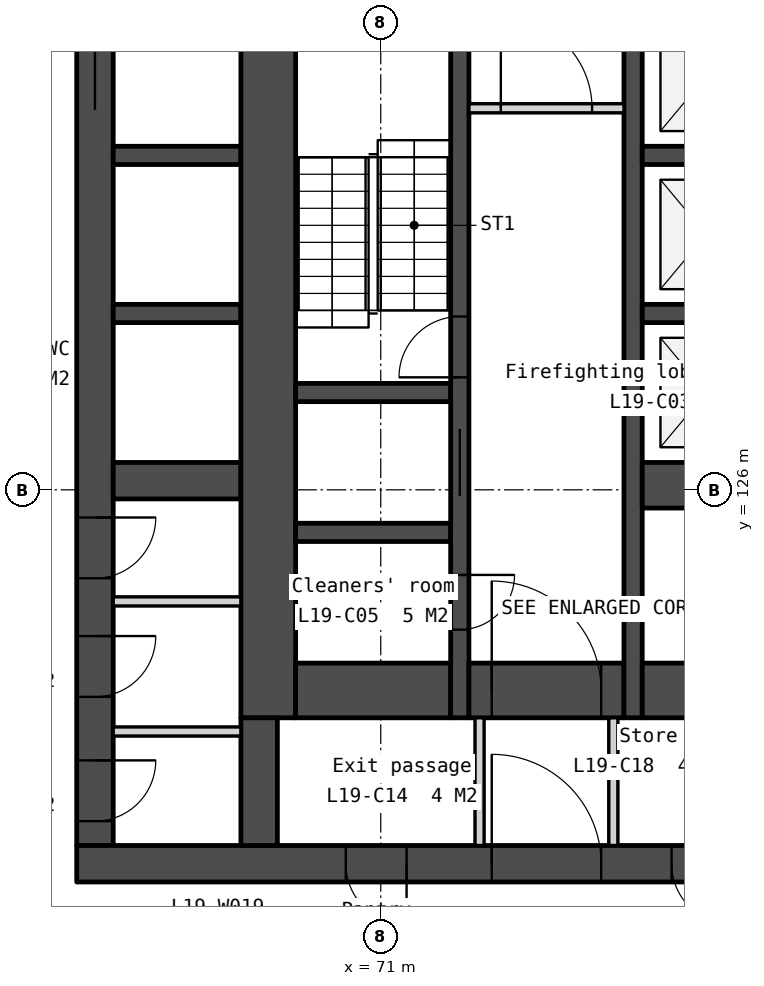
"""IFC4 building model, lengths in metres.
Left out: names, types, materials, properties, quantities, classifications, styles, units other than length and angle.
Written with IfcOpenShell. Run it as: python <this file> out.ifc"""

import sys

from ifc_helpers import new_model, si_unit, direction, frame, frame_2d, origin, place, context, subcontext, project, spatial, polyline, rectangle, outline, extrude, element, fill, save


model = new_model("IFC4")
c1 = context("Model", 3, precision=1e-05, world=origin(), true_north=direction((0.0, 1.0)))
c2 = subcontext(c1, "Body", "Model", "MODEL_VIEW")
j1 = project(units=[si_unit("LENGTHUNIT", "METRE"), si_unit("PLANEANGLEUNIT", "RADIAN")], contexts=[c1])
p1 = place(None, origin())
s1 = spatial("IfcSite", under=j1, at=p1, CompositionType="ELEMENT")
p2 = place(p1, origin())
s2 = spatial("IfcBuilding", under=s1, at=p2, CompositionType="ELEMENT")
p3 = place(p2, frame((0.0, 0.0, 81.8)))
s3 = spatial("IfcBuildingStorey", under=s2, at=p3, CompositionType="ELEMENT", Elevation=81.8)
p4 = place(p3, frame((66.3, 133.95, 0.0), z_axis=(0.0, 0.0, 1.0), x_axis=(0.0, -1.0, 0.0)))
e1 = element("IfcWall", 1, at=p4, inside=s3, PredefinedType="SOLIDWALL", context=c2, shape_type="SweptSolid", body=[
    extrude(rectangle(XDim=13.8, YDim=0.6, at=frame_2d((6.9, 0.0))), origin(), (0.0, 0.0, 1.0), 3.35),
])
p5 = place(p4, frame((0.6, 0.0, 0.0)))
e2 = element("IfcOpeningElement", 2, at=p5, cuts=e1, PredefinedType="OPENING", context=c2, shape_type="SweptSolid", body=[
    extrude(rectangle(XDim=1.1, YDim=2.1, at=frame_2d((0.55, 1.05))), frame((0.0, 0.31, 0.0), z_axis=(0.0, -1.0, 0.0), x_axis=(1.0, 0.0, 0.0)), (0.0, 0.0, 1.0), 0.62),
])
p6 = place(p4, frame((8.405, 0.0, 0.0)))
e3 = element("IfcOpeningElement", 3, at=p6, cuts=e1, PredefinedType="OPENING", context=c2, shape_type="SweptSolid", body=[
    extrude(rectangle(XDim=1.0, YDim=2.1, at=frame_2d((0.5, 1.05))), frame((0.0, 0.31, 0.0), z_axis=(0.0, -1.0, 0.0), x_axis=(1.0, 0.0, 0.0)), (0.0, 0.0, 1.0), 0.62),
])
p7 = place(p4, frame((10.355, 0.0, 0.0)))
e4 = element("IfcOpeningElement", 4, at=p7, cuts=e1, PredefinedType="OPENING", context=c2, shape_type="SweptSolid", body=[
    extrude(rectangle(XDim=1.0, YDim=2.1, at=frame_2d((0.5, 1.05))), frame((0.0, 0.31, 0.0), z_axis=(0.0, -1.0, 0.0), x_axis=(1.0, 0.0, 0.0)), (0.0, 0.0, 1.0), 0.62),
])
p8 = place(p4, frame((12.4, 0.0, 0.0)))
e5 = element("IfcOpeningElement", 5, at=p8, cuts=e1, PredefinedType="OPENING", context=c2, shape_type="SweptSolid", body=[
    extrude(rectangle(XDim=1.0, YDim=2.1, at=frame_2d((0.5, 1.05))), frame((0.0, 0.31, 0.0), z_axis=(0.0, -1.0, 0.0), x_axis=(1.0, 0.0, 0.0)), (0.0, 0.0, 1.0), 0.62),
])
p9 = place(p3, frame((66.0, 119.85, 0.0), z_axis=(0.0, 0.0, 1.0), x_axis=(1.0, 0.0, 0.0)))
e6 = element("IfcWall", 6, at=p9, inside=s3, PredefinedType="SOLIDWALL", context=c2, shape_type="SweptSolid", body=[
    extrude(rectangle(XDim=28.0, YDim=0.6, at=frame_2d((14.0, 0.0))), origin(), (0.0, 0.0, 1.0), 3.35),
])
p10 = place(p9, frame((6.825, 0.0, 0.0)))
e7 = element("IfcOpeningElement", 7, at=p10, cuts=e6, PredefinedType="OPENING", context=c2, shape_type="SweptSolid", body=[
    extrude(rectangle(XDim=1.8, YDim=2.1, at=frame_2d((0.9, 1.05))), frame((0.0, 0.31, 0.0), z_axis=(0.0, -1.0, 0.0), x_axis=(1.0, 0.0, 0.0)), (0.0, 0.0, 1.0), 0.62),
])
p11 = place(p9, frame((15.85, 0.0, 0.0)))
e8 = element("IfcOpeningElement", 8, at=p11, cuts=e6, PredefinedType="OPENING", context=c2, shape_type="SweptSolid", body=[
    extrude(rectangle(XDim=1.5, YDim=2.1, at=frame_2d((0.75, 1.05))), frame((0.0, 0.31, 0.0), z_axis=(0.0, -1.0, 0.0), x_axis=(1.0, 0.0, 0.0)), (0.0, 0.0, 1.0), 0.62),
])
p12 = place(p9, frame((19.375, 0.0, 0.0)))
e9 = element("IfcOpeningElement", 9, at=p12, cuts=e6, PredefinedType="OPENING", context=c2, shape_type="SweptSolid", body=[
    extrude(rectangle(XDim=1.8, YDim=2.1, at=frame_2d((0.9, 1.05))), frame((0.0, 0.31, 0.0), z_axis=(0.0, -1.0, 0.0), x_axis=(1.0, 0.0, 0.0)), (0.0, 0.0, 1.0), 0.62),
])
p13 = place(p9, frame((4.425, 0.0, 0.0)))
e10 = element("IfcOpeningElement", 10, at=p13, cuts=e6, PredefinedType="OPENING", context=c2, shape_type="SweptSolid", body=[
    extrude(rectangle(XDim=1.0, YDim=2.1, at=frame_2d((0.5, 1.05))), frame((0.0, 0.31, 0.0), z_axis=(0.0, -1.0, 0.0), x_axis=(1.0, 0.0, 0.0)), (0.0, 0.0, 1.0), 0.62),
])
p14 = place(p9, frame((9.783, 0.0, 0.0)))
e11 = element("IfcOpeningElement", 11, at=p14, cuts=e6, PredefinedType="OPENING", context=c2, shape_type="SweptSolid", body=[
    extrude(rectangle(XDim=1.0, YDim=2.1, at=frame_2d((0.5, 1.05))), frame((0.0, 0.31, 0.0), z_axis=(0.0, -1.0, 0.0), x_axis=(1.0, 0.0, 0.0)), (0.0, 0.0, 1.0), 0.62),
])
p15 = place(p9, frame((11.525, 0.0, 0.0)))
e12 = element("IfcOpeningElement", 12, at=p15, cuts=e6, PredefinedType="OPENING", context=c2, shape_type="SweptSolid", body=[
    extrude(rectangle(XDim=1.0, YDim=2.1, at=frame_2d((0.5, 1.05))), frame((0.0, 0.31, 0.0), z_axis=(0.0, -1.0, 0.0), x_axis=(1.0, 0.0, 0.0)), (0.0, 0.0, 1.0), 0.62),
])
p16 = place(p9, frame((13.658, 0.0, 0.0)))
e13 = element("IfcOpeningElement", 13, at=p16, cuts=e6, PredefinedType="OPENING", context=c2, shape_type="SweptSolid", body=[
    extrude(rectangle(XDim=1.0, YDim=2.1, at=frame_2d((0.5, 1.05))), frame((0.0, 0.31, 0.0), z_axis=(0.0, -1.0, 0.0), x_axis=(1.0, 0.0, 0.0)), (0.0, 0.0, 1.0), 0.62),
])
p17 = place(p9, frame((21.725, 0.0, 0.0)))
e14 = element("IfcOpeningElement", 14, at=p17, cuts=e6, PredefinedType="OPENING", context=c2, shape_type="SweptSolid", body=[
    extrude(rectangle(XDim=1.0, YDim=2.1, at=frame_2d((0.5, 1.05))), frame((0.0, 0.31, 0.0), z_axis=(0.0, -1.0, 0.0), x_axis=(1.0, 0.0, 0.0)), (0.0, 0.0, 1.0), 0.62),
])
p18 = place(p9, frame((23.425, 0.0, 0.0)))
e15 = element("IfcOpeningElement", 15, at=p18, cuts=e6, PredefinedType="OPENING", context=c2, shape_type="SweptSolid", body=[
    extrude(rectangle(XDim=1.0, YDim=2.1, at=frame_2d((0.5, 1.05))), frame((0.0, 0.31, 0.0), z_axis=(0.0, -1.0, 0.0), x_axis=(1.0, 0.0, 0.0)), (0.0, 0.0, 1.0), 0.62),
])
for number, where, z_axis, x_axis in (
    (16, (66.6, 131.5, 0.0), (0.0, 0.0, 1.0), (1.0, 0.0, 0.0)),
    (17, (66.6, 128.9, 0.0), (0.0, 0.0, 1.0), (1.0, 0.0, 0.0)),
):
    element("IfcWall", number, at=place(p3, frame(where, z_axis=z_axis, x_axis=x_axis)), inside=s3, PredefinedType="SOLIDWALL", context=c2, shape_type="SweptSolid", body=[
        extrude(rectangle(XDim=2.1, YDim=0.3, at=frame_2d((1.05, 0.0))), origin(), (0.0, 0.0, 1.0), 3.35),
    ])
p19 = place(p3, frame((66.6, 126.15, 0.0), z_axis=(0.0, 0.0, 1.0), x_axis=(1.0, 0.0, 0.0)))
e18 = element("IfcWall", 18, at=p19, inside=s3, PredefinedType="SOLIDWALL", context=c2, shape_type="SweptSolid", body=[
    extrude(rectangle(XDim=2.1, YDim=0.6, at=frame_2d((1.05, 0.0))), origin(), (0.0, 0.0, 1.0), 3.35),
])
for number, where, z_axis, x_axis in (
    (19, (66.6, 124.165, 0.0), (0.0, 0.0, 1.0), (1.0, 0.0, 0.0)),
    (20, (66.6, 122.025, 0.0), (0.0, 0.0, 1.0), (1.0, 0.0, 0.0)),
):
    element("IfcWall", number, at=place(p3, frame(where, z_axis=z_axis, x_axis=x_axis)), inside=s3, PredefinedType="PARTITIONING", context=c2, shape_type="SweptSolid", body=[
        extrude(rectangle(XDim=2.1, YDim=0.15, at=frame_2d((1.05, 0.0))), origin(), (0.0, 0.0, 1.0), 3.35),
    ])
p20 = place(p3, frame((69.15, 133.95, 0.0), z_axis=(0.0, 0.0, 1.0), x_axis=(0.0, -1.0, 0.0)))
e21 = element("IfcWall", 21, at=p20, inside=s3, PredefinedType="SOLIDWALL", context=c2, shape_type="SweptSolid", body=[
    extrude(rectangle(XDim=11.7, YDim=0.9, at=frame_2d((5.85, 0.0))), origin(), (0.0, 0.0, 1.0), 3.35),
])
p21 = place(p3, frame((69.0, 122.25, 0.0), z_axis=(0.0, 0.0, 1.0), x_axis=(0.0, -1.0, 0.0)))
e22 = element("IfcWall", 22, at=p21, inside=s3, PredefinedType="SOLIDWALL", context=c2, shape_type="SweptSolid", body=[
    extrude(rectangle(XDim=2.1, YDim=0.6, at=frame_2d((1.05, 0.0))), origin(), (0.0, 0.0, 1.0), 3.35),
])
for number, where, z_axis, x_axis in (
    (23, (69.6, 127.6, 0.0), (0.0, 0.0, 1.0), (1.0, 0.0, 0.0)),
    (24, (69.6, 125.3, 0.0), (0.0, 0.0, 1.0), (1.0, 0.0, 0.0)),
):
    element("IfcWall", number, at=place(p3, frame(where, z_axis=z_axis, x_axis=x_axis)), inside=s3, PredefinedType="SOLIDWALL", context=c2, shape_type="SweptSolid", body=[
        extrude(rectangle(XDim=2.55, YDim=0.3, at=frame_2d((1.275, 0.0))), origin(), (0.0, 0.0, 1.0), 3.35),
    ])
p22 = place(p3, frame((69.6, 122.7, 0.0), z_axis=(0.0, 0.0, 1.0), x_axis=(1.0, 0.0, 0.0)))
e25 = element("IfcWall", 25, at=p22, inside=s3, PredefinedType="SOLIDWALL", context=c2, shape_type="SweptSolid", body=[
    extrude(rectangle(XDim=2.55, YDim=0.9, at=frame_2d((1.275, 0.0))), origin(), (0.0, 0.0, 1.0), 3.35),
])
p23 = place(p3, frame((72.3, 133.95, 0.0), z_axis=(0.0, 0.0, 1.0), x_axis=(0.0, -1.0, 0.0)))
e26 = element("IfcWall", 26, at=p23, inside=s3, PredefinedType="SOLIDWALL", context=c2, shape_type="SweptSolid", body=[
    extrude(rectangle(XDim=11.7, YDim=0.3, at=frame_2d((5.85, 0.0))), origin(), (0.0, 0.0, 1.0), 3.35),
])
p24 = place(p23, frame((6.95, 0.0, 0.0)))
e27 = element("IfcOpeningElement", 27, at=p24, cuts=e26, PredefinedType="OPENING", context=c2, shape_type="SweptSolid", body=[
    extrude(rectangle(XDim=1.1, YDim=2.1, at=frame_2d((0.55, 1.05))), frame((0.0, 0.16, 0.0), z_axis=(0.0, -1.0, 0.0), x_axis=(1.0, 0.0, 0.0)), (0.0, 0.0, 1.0), 0.32),
])
p25 = place(p23, frame((9.35, 0.0, 0.0)))
e28 = element("IfcOpeningElement", 28, at=p25, cuts=e26, PredefinedType="OPENING", context=c2, shape_type="SweptSolid", body=[
    extrude(rectangle(XDim=0.9, YDim=2.1, at=frame_2d((0.45, 1.05))), frame((0.0, 0.16, 0.0), z_axis=(0.0, -1.0, 0.0), x_axis=(1.0, 0.0, 0.0)), (0.0, 0.0, 1.0), 0.32),
])
p26 = place(p23, frame((5.1, 0.0, 0.0)))
e29 = element("IfcOpeningElement", 29, at=p26, cuts=e26, PredefinedType="OPENING", context=c2, shape_type="SweptSolid", body=[
    extrude(rectangle(XDim=1.0, YDim=2.1, at=frame_2d((0.5, 1.05))), frame((0.0, 0.16, 0.0), z_axis=(0.0, -1.0, 0.0), x_axis=(1.0, 0.0, 0.0)), (0.0, 0.0, 1.0), 0.32),
])
p27 = place(p3, frame((72.45, 132.275, 0.0), z_axis=(0.0, 0.0, 1.0), x_axis=(1.0, 0.0, 0.0)))
e30 = element("IfcWall", 30, at=p27, inside=s3, PredefinedType="PARTITIONING", context=c2, shape_type="SweptSolid", body=[
    extrude(rectangle(XDim=2.55, YDim=0.15, at=frame_2d((1.275, 0.0))), origin(), (0.0, 0.0, 1.0), 3.35),
])
p28 = place(p27, frame((0.525, 0.0, 0.0)))
e31 = element("IfcOpeningElement", 31, at=p28, cuts=e30, PredefinedType="OPENING", context=c2, shape_type="SweptSolid", body=[
    extrude(rectangle(XDim=1.5, YDim=2.1, at=frame_2d((0.75, 1.05))), frame((0.0, 0.085, 0.0), z_axis=(0.0, -1.0, 0.0), x_axis=(1.0, 0.0, 0.0)), (0.0, 0.0, 1.0), 0.17),
])
p29 = place(p3, frame((72.45, 122.7, 0.0), z_axis=(0.0, 0.0, 1.0), x_axis=(1.0, 0.0, 0.0)))
e32 = element("IfcWall", 32, at=p29, inside=s3, PredefinedType="SOLIDWALL", context=c2, shape_type="SweptSolid", body=[
    extrude(rectangle(XDim=2.55, YDim=0.9, at=frame_2d((1.275, 0.0))), origin(), (0.0, 0.0, 1.0), 3.35),
])
p30 = place(p29, frame((0.375, 0.0, 0.0)))
e33 = element("IfcOpeningElement", 33, at=p30, cuts=e32, PredefinedType="OPENING", context=c2, shape_type="SweptSolid", body=[
    extrude(rectangle(XDim=1.8, YDim=2.1, at=frame_2d((0.9, 1.05))), frame((0.0, 0.46, 0.0), z_axis=(0.0, -1.0, 0.0), x_axis=(1.0, 0.0, 0.0)), (0.0, 0.0, 1.0), 0.92),
])
for number, where, z_axis, x_axis in (
    (34, (72.625, 122.25, 0.0), (0.0, 0.0, 1.0), (0.0, -1.0, 0.0)),
    (35, (74.825, 122.25, 0.0), (0.0, 0.0, 1.0), (0.0, -1.0, 0.0)),
):
    element("IfcWall", number, at=place(p3, frame(where, z_axis=z_axis, x_axis=x_axis)), inside=s3, PredefinedType="PARTITIONING", context=c2, shape_type="SweptSolid", body=[
        extrude(rectangle(XDim=2.1, YDim=0.15, at=frame_2d((1.05, 0.0))), origin(), (0.0, 0.0, 1.0), 3.35),
    ])
p31 = place(p3, frame((75.15, 133.95, 0.0), z_axis=(0.0, 0.0, 1.0), x_axis=(0.0, -1.0, 0.0)))
e36 = element("IfcWall", 36, at=p31, inside=s3, PredefinedType="SOLIDWALL", context=c2, shape_type="SweptSolid", body=[
    extrude(rectangle(XDim=11.7, YDim=0.3, at=frame_2d((5.85, 0.0))), origin(), (0.0, 0.0, 1.0), 3.35),
])
for number, where, z_axis, x_axis in (
    (37, (75.3, 131.5, 0.0), (0.0, 0.0, 1.0), (1.0, 0.0, 0.0)),
    (38, (75.3, 128.9, 0.0), (0.0, 0.0, 1.0), (1.0, 0.0, 0.0)),
):
    element("IfcWall", number, at=place(p3, frame(where, z_axis=z_axis, x_axis=x_axis)), inside=s3, PredefinedType="SOLIDWALL", context=c2, shape_type="SweptSolid", body=[
        extrude(rectangle(XDim=2.1, YDim=0.3, at=frame_2d((1.05, 0.0))), origin(), (0.0, 0.0, 1.0), 3.35),
    ])
p32 = place(p3, frame((75.3, 126.075, 0.0), z_axis=(0.0, 0.0, 1.0), x_axis=(1.0, 0.0, 0.0)))
e39 = element("IfcWall", 39, at=p32, inside=s3, PredefinedType="SOLIDWALL", context=c2, shape_type="SweptSolid", body=[
    extrude(rectangle(XDim=2.1, YDim=0.75, at=frame_2d((1.05, 0.0))), origin(), (0.0, 0.0, 1.0), 3.35),
])
p33 = place(p3, frame((75.3, 122.7, 0.0), z_axis=(0.0, 0.0, 1.0), x_axis=(1.0, 0.0, 0.0)))
e40 = element("IfcWall", 40, at=p33, inside=s3, PredefinedType="SOLIDWALL", context=c2, shape_type="SweptSolid", body=[
    extrude(rectangle(XDim=6.2, YDim=0.9, at=frame_2d((3.1, 0.0))), origin(), (0.0, 0.0, 1.0), 3.35),
])
p34 = place(p3, frame((56.073, 130.263, -0.45), z_axis=(0.0, 0.0, 1.0), x_axis=(0.500000478905, -0.866025127289, 0.0)))
e41 = element("IfcWall", 41, at=p34, inside=s3, PredefinedType="SOLIDWALL", context=c2, shape_type="SweptSolid", body=[
    extrude(outline(polyline([(42.643, 0.0), (42.643, 3.8), (0.0, 3.8), (0.0, 0.0), (42.643, 0.0)])), frame((0.0, 0.225, 0.0), z_axis=(0.0, -1.0, 0.0), x_axis=(1.0, 0.0, 0.0)), (0.0, 0.0, 1.0), 0.45),
])
p35 = place(p34, frame((2.814, 0.0, 1.35)))
e42 = element("IfcOpeningElement", 42, at=p35, cuts=e41, PredefinedType="OPENING", context=c2, shape_type="SweptSolid", body=[
    extrude(rectangle(XDim=1.2, YDim=1.5, at=frame_2d((0.6, 0.75))), frame((0.0, 0.235, 0.0), z_axis=(0.0, -1.0, 0.0), x_axis=(1.0, 0.0, 0.0)), (0.0, 0.0, 1.0), 0.47),
])
p36 = place(p34, frame((4.514, 0.0, 1.35)))
e43 = element("IfcOpeningElement", 43, at=p36, cuts=e41, PredefinedType="OPENING", context=c2, shape_type="SweptSolid", body=[
    extrude(rectangle(XDim=1.2, YDim=1.5, at=frame_2d((0.6, 0.75))), frame((0.0, 0.235, 0.0), z_axis=(0.0, -1.0, 0.0), x_axis=(1.0, 0.0, 0.0)), (0.0, 0.0, 1.0), 0.47),
])
p37 = place(p34, frame((11.343, 0.0, 1.35)))
e44 = element("IfcOpeningElement", 44, at=p37, cuts=e41, PredefinedType="OPENING", context=c2, shape_type="SweptSolid", body=[
    extrude(rectangle(XDim=1.2, YDim=1.5, at=frame_2d((0.6, 0.75))), frame((0.0, 0.235, 0.0), z_axis=(0.0, -1.0, 0.0), x_axis=(1.0, 0.0, 0.0)), (0.0, 0.0, 1.0), 0.47),
])
p38 = place(p34, frame((13.043, 0.0, 1.35)))
e45 = element("IfcOpeningElement", 45, at=p38, cuts=e41, PredefinedType="OPENING", context=c2, shape_type="SweptSolid", body=[
    extrude(rectangle(XDim=1.2, YDim=1.5, at=frame_2d((0.6, 0.75))), frame((0.0, 0.235, 0.0), z_axis=(0.0, -1.0, 0.0), x_axis=(1.0, 0.0, 0.0)), (0.0, 0.0, 1.0), 0.47),
])
p39 = place(p34, frame((19.872, 0.0, 1.35)))
e46 = element("IfcOpeningElement", 46, at=p39, cuts=e41, PredefinedType="OPENING", context=c2, shape_type="SweptSolid", body=[
    extrude(rectangle(XDim=1.2, YDim=1.5, at=frame_2d((0.6, 0.75))), frame((0.0, 0.235, 0.0), z_axis=(0.0, -1.0, 0.0), x_axis=(1.0, 0.0, 0.0)), (0.0, 0.0, 1.0), 0.47),
])
p40 = place(p34, frame((21.572, 0.0, 1.35)))
e47 = element("IfcOpeningElement", 47, at=p40, cuts=e41, PredefinedType="OPENING", context=c2, shape_type="SweptSolid", body=[
    extrude(rectangle(XDim=1.2, YDim=1.5, at=frame_2d((0.6, 0.75))), frame((0.0, 0.235, 0.0), z_axis=(0.0, -1.0, 0.0), x_axis=(1.0, 0.0, 0.0)), (0.0, 0.0, 1.0), 0.47),
])
p41 = place(p34, frame((28.4, 0.0, 1.35)))
e48 = element("IfcOpeningElement", 48, at=p41, cuts=e41, PredefinedType="OPENING", context=c2, shape_type="SweptSolid", body=[
    extrude(rectangle(XDim=1.2, YDim=1.5, at=frame_2d((0.6, 0.75))), frame((0.0, 0.235, 0.0), z_axis=(0.0, -1.0, 0.0), x_axis=(1.0, 0.0, 0.0)), (0.0, 0.0, 1.0), 0.47),
])
p42 = place(p34, frame((30.1, 0.0, 1.35)))
e49 = element("IfcOpeningElement", 49, at=p42, cuts=e41, PredefinedType="OPENING", context=c2, shape_type="SweptSolid", body=[
    extrude(rectangle(XDim=1.2, YDim=1.5, at=frame_2d((0.6, 0.75))), frame((0.0, 0.235, 0.0), z_axis=(0.0, -1.0, 0.0), x_axis=(1.0, 0.0, 0.0)), (0.0, 0.0, 1.0), 0.47),
])
p43 = place(p34, frame((36.929, 0.0, 1.35)))
e50 = element("IfcOpeningElement", 50, at=p43, cuts=e41, PredefinedType="OPENING", context=c2, shape_type="SweptSolid", body=[
    extrude(rectangle(XDim=1.2, YDim=1.5, at=frame_2d((0.6, 0.75))), frame((0.0, 0.235, 0.0), z_axis=(0.0, -1.0, 0.0), x_axis=(1.0, 0.0, 0.0)), (0.0, 0.0, 1.0), 0.47),
])
p44 = place(p34, frame((38.629, 0.0, 1.35)))
e51 = element("IfcOpeningElement", 51, at=p44, cuts=e41, PredefinedType="OPENING", context=c2, shape_type="SweptSolid", body=[
    extrude(rectangle(XDim=1.2, YDim=1.5, at=frame_2d((0.6, 0.75))), frame((0.0, 0.235, 0.0), z_axis=(0.0, -1.0, 0.0), x_axis=(1.0, 0.0, 0.0)), (0.0, 0.0, 1.0), 0.47),
])
p45 = place(p5, origin())
e52 = element("IfcDoor", 52, at=p45, inside=s3, OperationType="SLIDING_TO_LEFT", PredefinedType="DOOR", context=c2, shape_type="SweptSolid", body=[
    extrude(rectangle(XDim=1.1, YDim=2.1, at=frame_2d((0.55, 1.05))), frame((0.0, 0.025, 0.0), z_axis=(0.0, -1.0, 0.0), x_axis=(1.0, 0.0, 0.0)), (0.0, 0.0, 1.0), 0.05),
])
fill(e2, e52)
p46 = place(p24, origin())
e53 = element("IfcDoor", 53, at=p46, inside=s3, OperationType="SLIDING_TO_LEFT", PredefinedType="DOOR", context=c2, shape_type="SweptSolid", body=[
    extrude(rectangle(XDim=1.1, YDim=2.1, at=frame_2d((0.55, 1.05))), frame((0.0, 0.025, 0.0), z_axis=(0.0, -1.0, 0.0), x_axis=(1.0, 0.0, 0.0)), (0.0, 0.0, 1.0), 0.05),
])
fill(e27, e53)
p47 = place(p30, origin())
e54 = element("IfcDoor", 54, at=p47, inside=s3, OperationType="DOUBLE_DOOR_DOUBLE_SWING", PredefinedType="DOOR", context=c2, shape_type="SweptSolid", body=[
    extrude(rectangle(XDim=1.8, YDim=2.1, at=frame_2d((0.9, 1.05))), frame((0.0, 0.025, 0.0), z_axis=(0.0, -1.0, 0.0), x_axis=(1.0, 0.0, 0.0)), (0.0, 0.0, 1.0), 0.05),
])
fill(e33, e54)
p48 = place(p10, origin())
e55 = element("IfcDoor", 55, at=p48, inside=s3, OperationType="DOUBLE_DOOR_DOUBLE_SWING", PredefinedType="DOOR", context=c2, shape_type="SweptSolid", body=[
    extrude(rectangle(XDim=1.8, YDim=2.1, at=frame_2d((0.9, 1.05))), frame((0.0, 0.025, 0.0), z_axis=(0.0, -1.0, 0.0), x_axis=(1.0, 0.0, 0.0)), (0.0, 0.0, 1.0), 0.05),
])
fill(e7, e55)
p49 = place(p28, origin())
e56 = element("IfcDoor", 56, at=p49, inside=s3, OperationType="DOUBLE_DOOR_DOUBLE_SWING", PredefinedType="DOOR", context=c2, shape_type="SweptSolid", body=[
    extrude(rectangle(XDim=1.5, YDim=2.1, at=frame_2d((0.75, 1.05))), frame((0.0, 0.025, 0.0), z_axis=(0.0, -1.0, 0.0), x_axis=(1.0, 0.0, 0.0)), (0.0, 0.0, 1.0), 0.05),
])
fill(e31, e56)
p50 = place(p25, origin())
e57 = element("IfcDoor", 57, at=p50, inside=s3, OperationType="SINGLE_SWING_LEFT", PredefinedType="DOOR", context=c2, shape_type="SweptSolid", body=[
    extrude(rectangle(XDim=0.9, YDim=2.1, at=frame_2d((0.45, 1.05))), frame((0.0, 0.025, 0.0), z_axis=(0.0, -1.0, 0.0), x_axis=(1.0, 0.0, 0.0)), (0.0, 0.0, 1.0), 0.05),
])
fill(e28, e57)
p51 = place(p13, origin())
e58 = element("IfcDoor", 58, at=p51, inside=s3, OperationType="SINGLE_SWING_RIGHT", PredefinedType="DOOR", context=c2, shape_type="SweptSolid", body=[
    extrude(rectangle(XDim=1.0, YDim=2.1, at=frame_2d((0.5, 1.05))), frame((0.0, 0.025, 0.0), z_axis=(0.0, -1.0, 0.0), x_axis=(1.0, 0.0, 0.0)), (0.0, 0.0, 1.0), 0.05),
])
fill(e10, e58)
p52 = place(p14, origin())
e59 = element("IfcDoor", 59, at=p52, inside=s3, OperationType="SINGLE_SWING_RIGHT", PredefinedType="DOOR", context=c2, shape_type="SweptSolid", body=[
    extrude(rectangle(XDim=1.0, YDim=2.1, at=frame_2d((0.5, 1.05))), frame((0.0, 0.025, 0.0), z_axis=(0.0, -1.0, 0.0), x_axis=(1.0, 0.0, 0.0)), (0.0, 0.0, 1.0), 0.05),
])
fill(e11, e59)
p53 = place(p26, origin())
e60 = element("IfcDoor", 60, at=p53, inside=s3, OperationType="SINGLE_SWING_RIGHT", PredefinedType="DOOR", context=c2, shape_type="SweptSolid", body=[
    extrude(rectangle(XDim=1.0, YDim=2.1, at=frame_2d((0.5, 1.05))), frame((0.0, 0.025, 0.0), z_axis=(0.0, -1.0, 0.0), x_axis=(1.0, 0.0, 0.0)), (0.0, 0.0, 1.0), 0.05),
])
fill(e29, e60)
p54 = place(p6, origin())
e61 = element("IfcDoor", 61, at=p54, inside=s3, OperationType="SINGLE_SWING_LEFT", PredefinedType="DOOR", context=c2, shape_type="SweptSolid", body=[
    extrude(rectangle(XDim=1.0, YDim=2.1, at=frame_2d((0.5, 1.05))), frame((0.0, 0.025, 0.0), z_axis=(0.0, -1.0, 0.0), x_axis=(1.0, 0.0, 0.0)), (0.0, 0.0, 1.0), 0.05),
])
fill(e3, e61)
p55 = place(p7, origin())
e62 = element("IfcDoor", 62, at=p55, inside=s3, OperationType="SINGLE_SWING_LEFT", PredefinedType="DOOR", context=c2, shape_type="SweptSolid", body=[
    extrude(rectangle(XDim=1.0, YDim=2.1, at=frame_2d((0.5, 1.05))), frame((0.0, 0.025, 0.0), z_axis=(0.0, -1.0, 0.0), x_axis=(1.0, 0.0, 0.0)), (0.0, 0.0, 1.0), 0.05),
])
fill(e4, e62)
p56 = place(p8, origin())
e63 = element("IfcDoor", 63, at=p56, inside=s3, OperationType="SINGLE_SWING_LEFT", PredefinedType="DOOR", context=c2, shape_type="SweptSolid", body=[
    extrude(rectangle(XDim=1.0, YDim=2.1, at=frame_2d((0.5, 1.05))), frame((0.0, 0.025, 0.0), z_axis=(0.0, -1.0, 0.0), x_axis=(1.0, 0.0, 0.0)), (0.0, 0.0, 1.0), 0.05),
])
fill(e5, e63)
save(model, sys.argv[1])
